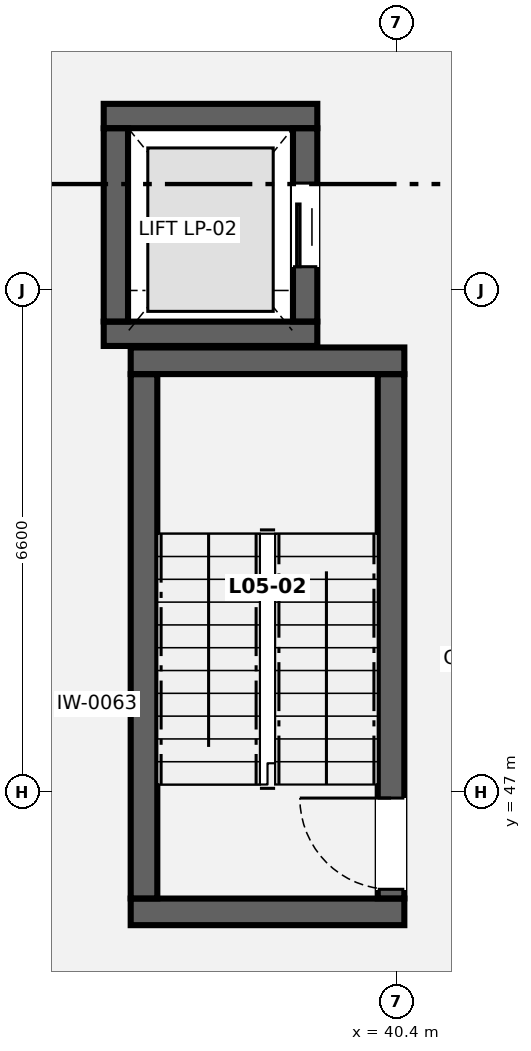
"""IFC4 building model, lengths in metres.
Left out: names, types, materials, properties, quantities, classifications, styles, units other than length and angle.
Written with IfcOpenShell. Run it as: python <this file> out.ifc"""

import sys

from ifc_helpers import new_model, si_unit, direction, frame, frame_2d, origin, place, context, subcontext, project, spatial, rectangle, extrude, element, fill, save


model = new_model("IFC4")
c1 = context("Model", 3, precision=1e-05, world=origin(), true_north=direction((0.0, 1.0)))
c2 = subcontext(c1, "Body", "Model", "MODEL_VIEW")
j1 = project(units=[si_unit("LENGTHUNIT", "METRE"), si_unit("PLANEANGLEUNIT", "RADIAN")], contexts=[c1])
p1 = place(None, origin())
s1 = spatial("IfcSite", under=j1, at=p1, CompositionType="ELEMENT")
p2 = place(p1, origin())
s2 = spatial("IfcBuilding", under=s1, at=p2, CompositionType="ELEMENT")
p3 = place(p2, frame((0.0, 0.0, 21.7)))
s3 = spatial("IfcBuildingStorey", under=s2, at=p3, CompositionType="ELEMENT", Elevation=21.7)
for number, where, z_axis, x_axis in (
    (1, (36.9, 45.425, 0.0), (0.0, 0.0, 1.0), (1.0, 0.0, 0.0)),
    (2, (36.9, 52.675, 0.0), (0.0, 0.0, 1.0), (1.0, 0.0, 0.0)),
):
    element("IfcWall", number, at=place(p3, frame(where, z_axis=z_axis, x_axis=x_axis)), inside=s3, PredefinedType="SHEAR", context=c2, shape_type="SweptSolid", body=[
        extrude(rectangle(XDim=3.6, YDim=0.35, at=frame_2d((1.8, 0.0))), origin(), (0.0, 0.0, 1.0), 3.98),
    ])
p4 = place(p3, frame((37.075, 45.602, 0.0), z_axis=(0.0, 0.0, 1.0), x_axis=(0.0, 1.0, 0.0)))
e3 = element("IfcWall", 3, at=p4, inside=s3, PredefinedType="SHEAR", context=c2, shape_type="SweptSolid", body=[
    extrude(rectangle(XDim=6.896, YDim=0.35, at=frame_2d((3.448, 0.0))), origin(), (0.0, 0.0, 1.0), 3.98),
])
p5 = place(p3, frame((40.325, 45.602, 0.0), z_axis=(0.0, 0.0, 1.0), x_axis=(0.0, 1.0, 0.0)))
e4 = element("IfcWall", 4, at=p5, inside=s3, PredefinedType="SHEAR", context=c2, shape_type="SweptSolid", body=[
    extrude(rectangle(XDim=6.896, YDim=0.35, at=frame_2d((3.448, 0.0))), origin(), (0.0, 0.0, 1.0), 3.98),
])
p6 = place(p5, frame((0.12, 0.0, 0.0)))
e5 = element("IfcOpeningElement", 5, at=p6, cuts=e4, PredefinedType="OPENING", context=c2, shape_type="SweptSolid", body=[
    extrude(rectangle(XDim=1.2, YDim=2.15, at=frame_2d((0.6, 1.075))), frame((0.0, 0.185, 0.0), z_axis=(0.0, -1.0, 0.0), x_axis=(1.0, 0.0, 0.0)), (0.0, 0.0, 1.0), 0.37),
])
for number, where, z_axis, x_axis in (
    (6, (36.545, 53.03, 0.0), (0.0, 0.0, 1.0), (1.0, 0.0, 0.0)),
    (7, (36.545, 55.895, 0.0), (0.0, 0.0, 1.0), (1.0, 0.0, 0.0)),
):
    element("IfcWall", number, at=place(p3, frame(where, z_axis=z_axis, x_axis=x_axis)), inside=s3, PredefinedType="SHEAR", context=c2, shape_type="SweptSolid", body=[
        extrude(rectangle(XDim=2.81, YDim=0.32, at=frame_2d((1.405, 0.0))), origin(), (0.0, 0.0, 1.0), 3.98),
    ])
p7 = place(p3, frame((36.705, 53.192, 0.0), z_axis=(0.0, 0.0, 1.0), x_axis=(0.0, 1.0, 0.0)))
e8 = element("IfcWall", 8, at=p7, inside=s3, PredefinedType="SHEAR", context=c2, shape_type="SweptSolid", body=[
    extrude(rectangle(XDim=2.541, YDim=0.32, at=frame_2d((1.271, 0.0))), origin(), (0.0, 0.0, 1.0), 3.98),
])
p8 = place(p3, frame((39.195, 53.192, 0.0), z_axis=(0.0, 0.0, 1.0), x_axis=(0.0, 1.0, 0.0)))
e9 = element("IfcWall", 9, at=p8, inside=s3, PredefinedType="SHEAR", context=c2, shape_type="SweptSolid", body=[
    extrude(rectangle(XDim=2.541, YDim=0.32, at=frame_2d((1.271, 0.0))), origin(), (0.0, 0.0, 1.0), 3.98),
])
p9 = place(p8, frame((0.72, 0.0, 0.0)))
e10 = element("IfcOpeningElement", 10, at=p9, cuts=e9, PredefinedType="OPENING", context=c2, shape_type="SweptSolid", body=[
    extrude(rectangle(XDim=1.1, YDim=2.15, at=frame_2d((0.55, 1.075))), frame((0.0, 0.17, 0.0), z_axis=(0.0, -1.0, 0.0), x_axis=(1.0, 0.0, 0.0)), (0.0, 0.0, 1.0), 0.34),
])
p10 = place(p6, origin())
e11 = element("IfcDoor", 11, at=p10, inside=s3, OperationType="SINGLE_SWING_RIGHT", PredefinedType="DOOR", context=c2, shape_type="SweptSolid", body=[
    extrude(rectangle(XDim=1.2, YDim=2.15, at=frame_2d((0.6, 1.075))), frame((0.0, 0.025, 0.0), z_axis=(0.0, -1.0, 0.0), x_axis=(1.0, 0.0, 0.0)), (0.0, 0.0, 1.0), 0.05),
])
fill(e5, e11)
p11 = place(p9, origin())
e12 = element("IfcDoor", 12, at=p11, inside=s3, OperationType="SLIDING_TO_LEFT", PredefinedType="DOOR", context=c2, shape_type="SweptSolid", body=[
    extrude(rectangle(XDim=1.1, YDim=2.15, at=frame_2d((0.55, 1.075))), frame((0.0, 0.025, 0.0), z_axis=(0.0, -1.0, 0.0), x_axis=(1.0, 0.0, 0.0)), (0.0, 0.0, 1.0), 0.05),
])
fill(e10, e12)
save(model, sys.argv[1])
